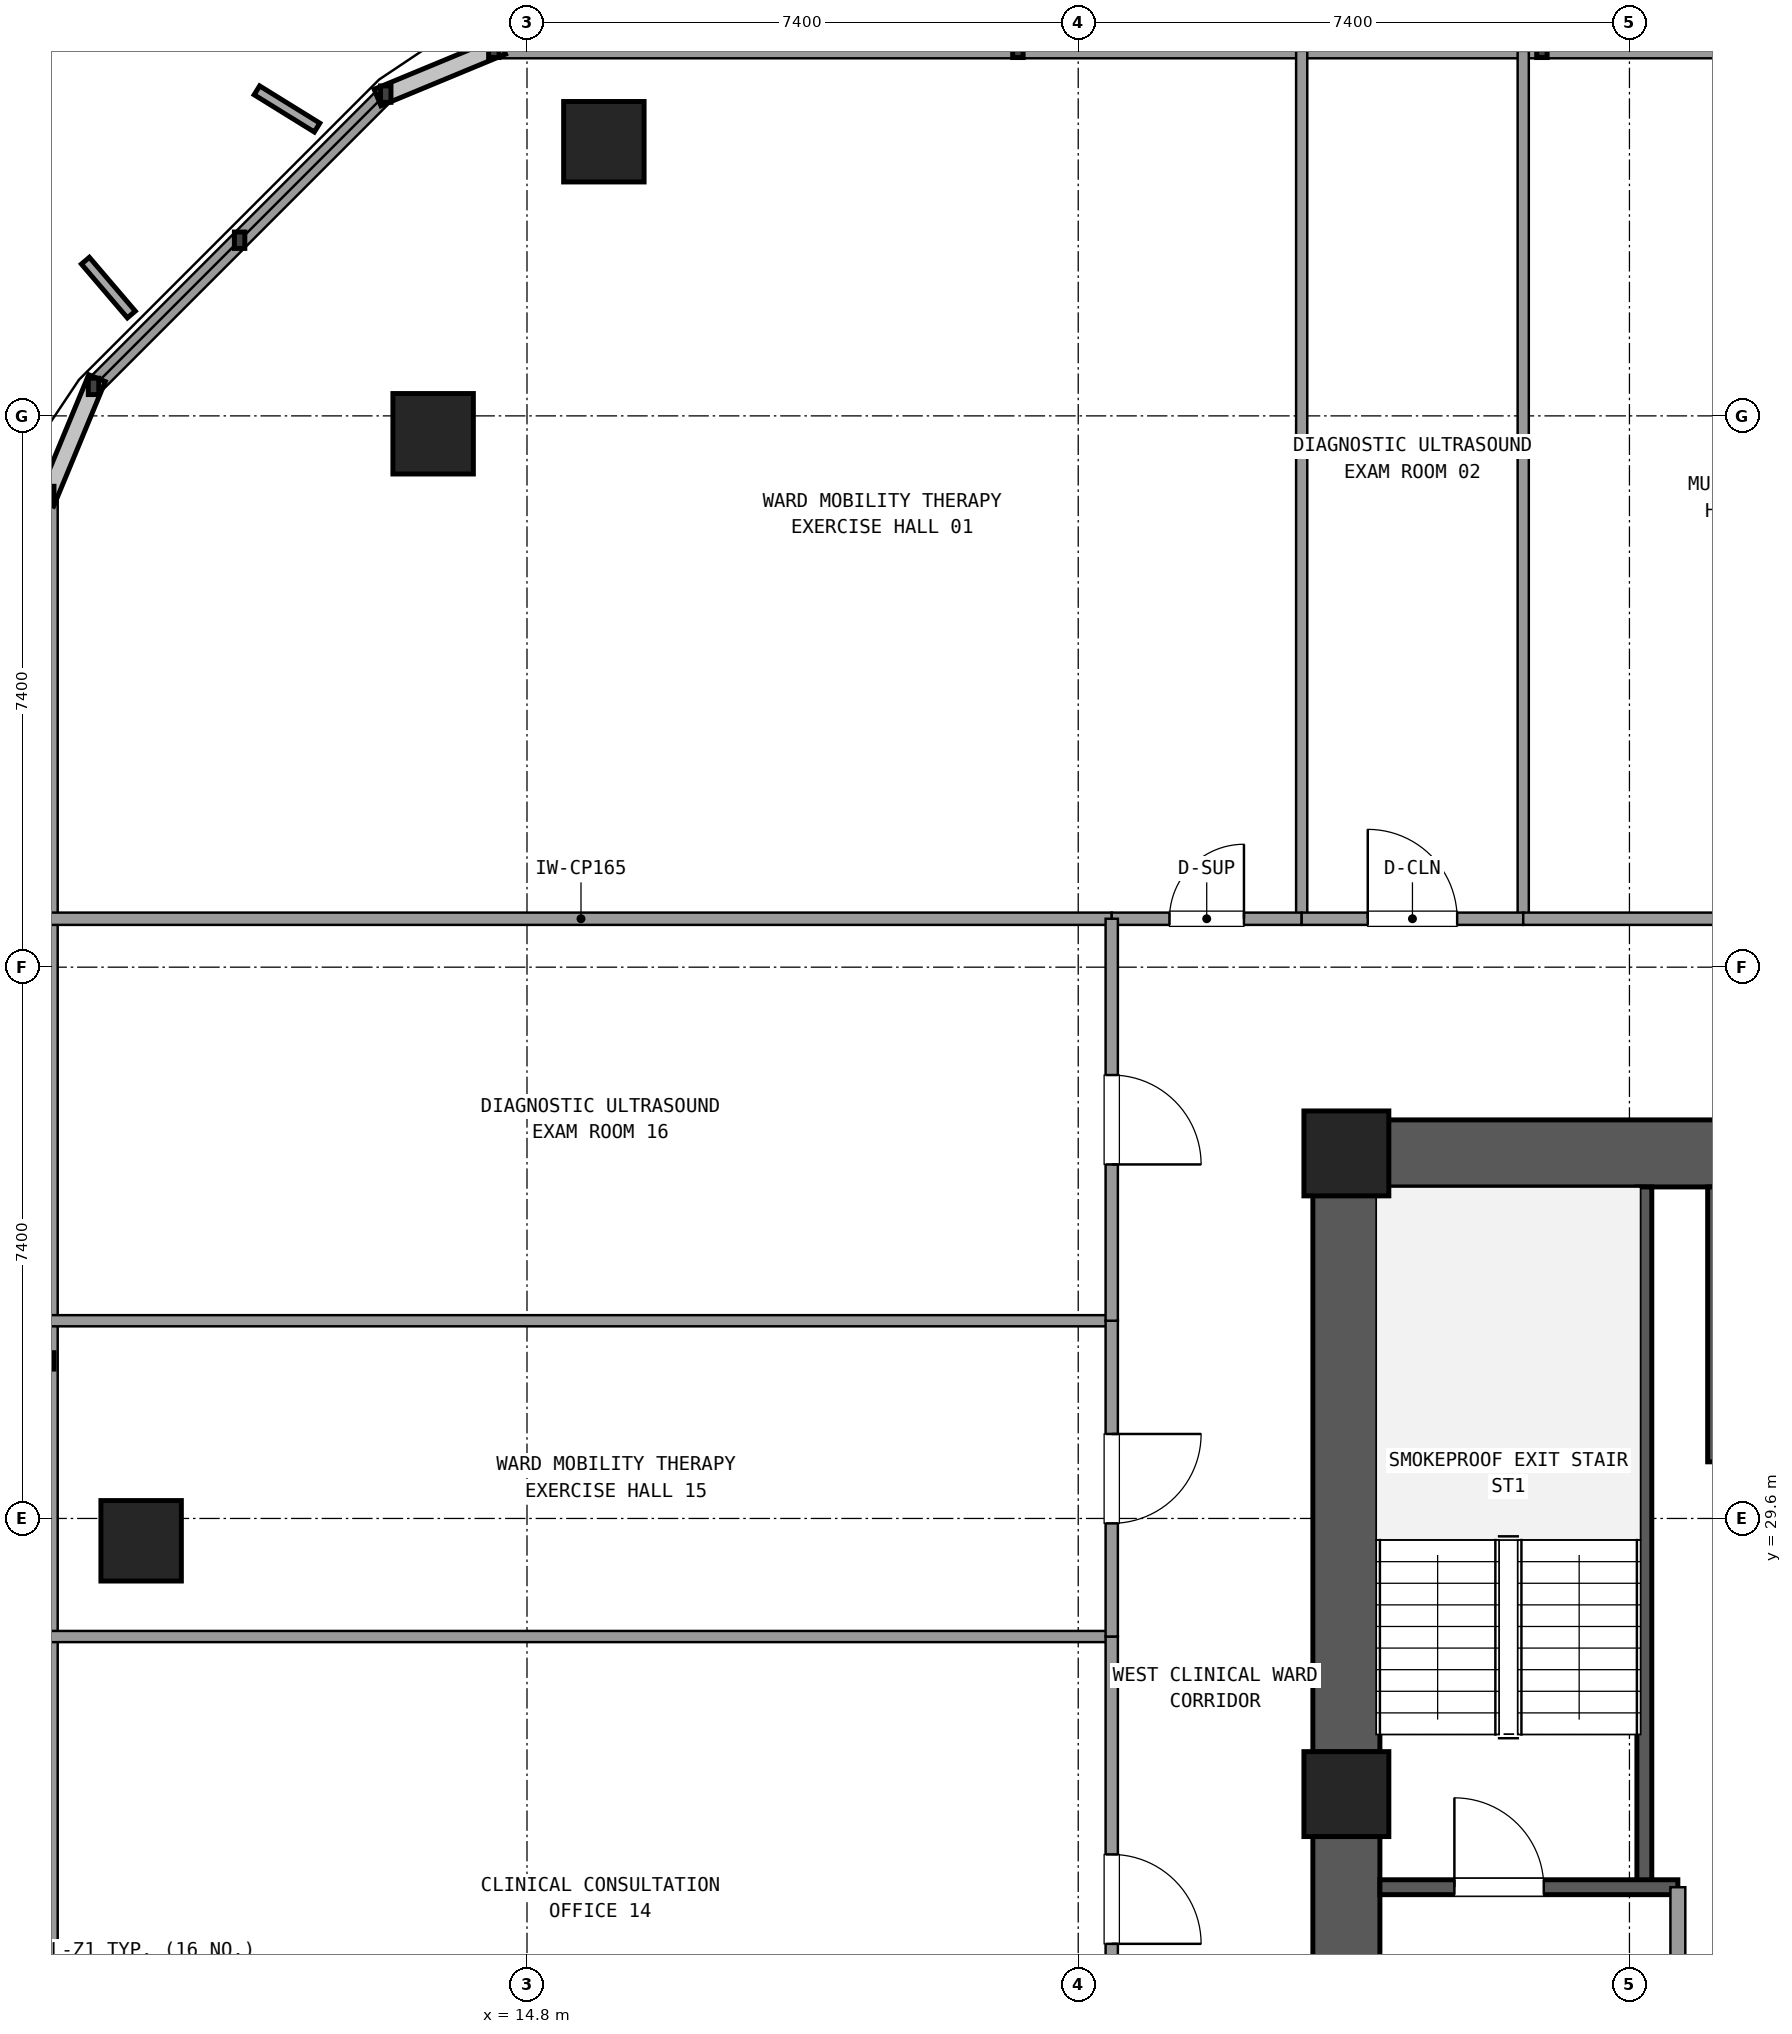
"""IFC4 building model, lengths in metres.
Left out: names, types, materials, properties, quantities, classifications, styles, units other than length and angle.
Written with IfcOpenShell. Run it as: python <this file> out.ifc"""

import sys

from ifc_helpers import new_model, si_unit, direction, frame, frame_2d, origin, origin_2d, place, context, subcontext, project, spatial, rectangle, extrude, element, fill, save


model = new_model("IFC4")
c1 = context("Model", 3, precision=1e-05, world=origin(), true_north=direction((0.0, 1.0)))
c2 = subcontext(c1, "Body", "Model", "MODEL_VIEW")
j1 = project(units=[si_unit("LENGTHUNIT", "METRE"), si_unit("PLANEANGLEUNIT", "RADIAN")], contexts=[c1])
p1 = place(None, origin())
s1 = spatial("IfcSite", under=j1, at=p1, CompositionType="ELEMENT")
p2 = place(p1, origin())
s2 = spatial("IfcBuilding", under=s1, at=p2, CompositionType="ELEMENT")
p3 = place(p2, frame((0.0, 0.0, 38.34)))
s3 = spatial("IfcBuildingStorey", under=s2, at=p3, CompositionType="ELEMENT", Elevation=38.34)
for number, where, z_axis, x_axis in (
    (1, (25.8, 34.5, 0.0), (0.0, 0.0, 1.0), (1.0, 0.0, 0.0)),
    (2, (25.8, 25.9, 0.0), (0.0, 0.0, 1.0), (1.0, 0.0, 0.0)),
):
    element("IfcColumn", number, at=place(p3, frame(where, z_axis=z_axis, x_axis=x_axis)), inside=s3, PredefinedType="COLUMN", context=c2, shape_type="SweptSolid", body=[
        extrude(rectangle(XDim=1.14, YDim=1.14, at=origin_2d()), origin(), (0.0, 0.0, 1.0), 3.6),
    ])
p4 = place(p3, frame((36.435, 34.5, 0.0), z_axis=(0.0, 0.0, 1.0), x_axis=(-1.0, 0.0, 0.0)))
e3 = element("IfcWall", 3, at=p4, inside=s3, PredefinedType="SHEAR", context=c2, shape_type="SweptSolid", body=[
    extrude(rectangle(XDim=10.07, YDim=0.9, at=frame_2d((5.035, 0.0))), origin(), (0.0, 0.0, 1.0), 3.32),
])
p5 = place(p4, frame((4.035, 0.0, 0.0)))
e4 = element("IfcOpeningElement", 4, at=p5, cuts=e3, PredefinedType="OPENING", context=c2, shape_type="SweptSolid", body=[
    extrude(rectangle(XDim=1.2, YDim=2.15, at=frame_2d((0.6, 1.075))), frame((0.0, 0.46, 0.0), z_axis=(0.0, -1.0, 0.0), x_axis=(1.0, 0.0, 0.0)), (0.0, 0.0, 1.0), 0.92),
])
p6 = place(p3, frame((25.8, 33.935, 0.0), z_axis=(0.0, 0.0, 1.0), x_axis=(0.0, -1.0, 0.0)))
e5 = element("IfcWall", 5, at=p6, inside=s3, PredefinedType="SHEAR", context=c2, shape_type="SweptSolid", body=[
    extrude(rectangle(XDim=7.47, YDim=0.9, at=frame_2d((3.735, 0.0))), origin(), (0.0, 0.0, 1.0), 3.32),
])
p7 = place(p3, frame((25.8, 25.335, 0.0), z_axis=(0.0, 0.0, 1.0), x_axis=(0.0, -1.0, 0.0)))
e6 = element("IfcWall", 6, at=p7, inside=s3, PredefinedType="SHEAR", context=c2, shape_type="SweptSolid", body=[
    extrude(rectangle(XDim=7.47, YDim=0.9, at=frame_2d((3.735, 0.0))), origin(), (0.0, 0.0, 1.0), 3.32),
])
p8 = place(p7, frame((2.085, 0.0, 0.0)))
e7 = element("IfcOpeningElement", 7, at=p8, cuts=e6, PredefinedType="OPENING", context=c2, shape_type="SweptSolid", body=[
    extrude(rectangle(XDim=1.2, YDim=2.15, at=frame_2d((0.6, 1.075))), frame((0.0, 0.46, 0.0), z_axis=(0.0, -1.0, 0.0), x_axis=(1.0, 0.0, 0.0)), (0.0, 0.0, 1.0), 0.92),
])
for number, where, z_axis, x_axis in (
    (8, (15.832, 48.08, 0.0), (0.0, 0.0, 1.0), (1.0, 0.0, 0.0)),
    (9, (13.54, 44.16, 0.0), (0.0, 0.0, 1.0), (1.0, 0.0, 0.0)),
    (10, (9.62, 29.3, 0.0), (0.0, 0.0, 1.0), (1.0, 0.0, 0.0)),
):
    element("IfcColumn", number, at=place(p3, frame(where, z_axis=z_axis, x_axis=x_axis)), inside=s3, PredefinedType="COLUMN", context=c2, shape_type="SweptSolid", body=[
        extrude(rectangle(XDim=1.08, YDim=1.08, at=origin_2d()), origin(), (0.0, 0.0, 1.0), 3.6),
    ])
p9 = place(p3, frame((35.46, 49.32, 0.0), z_axis=(0.0, 0.0, 1.0), x_axis=(-1.0, 0.0, 0.0)))
e11 = element("IfcWall", 11, at=p9, inside=s3, PredefinedType="SOLIDWALL", context=c2, shape_type="SweptSolid", body=[
    extrude(rectangle(XDim=21.105, YDim=0.24, at=frame_2d((10.552, 0.0))), origin(), (0.0, 0.0, 1.0), 0.85),
])
p10 = place(p3, frame((12.904, 48.719, 0.0), z_axis=(0.0, 0.0, 1.0), x_axis=(-0.707106781187, -0.707106781187, 0.0)))
e12 = element("IfcWall", 12, at=p10, inside=s3, PredefinedType="SOLIDWALL", context=c2, shape_type="SweptSolid", body=[
    extrude(rectangle(XDim=5.548, YDim=0.24, at=frame_2d((2.774, 0.0))), origin(), (0.0, 0.0, 1.0), 0.85),
])
p11 = place(p3, frame((8.38, 43.345, 0.0), z_axis=(0.0, 0.0, 1.0), x_axis=(0.0, -1.0, 0.0)))
e13 = element("IfcWall", 13, at=p11, inside=s3, PredefinedType="SOLIDWALL", context=c2, shape_type="SweptSolid", body=[
    extrude(rectangle(XDim=34.89, YDim=0.24, at=frame_2d((17.445, 0.0))), origin(), (0.0, 0.0, 1.0), 0.85),
])
p12 = place(p3, frame((29.8, 24.65, 0.0), z_axis=(0.0, 0.0, 1.0), x_axis=(0.0, 1.0, 0.0)))
e14 = element("IfcWall", 14, at=p12, inside=s3, PredefinedType="SHEAR", context=c2, shape_type="SweptSolid", body=[
    extrude(rectangle(XDim=9.4, YDim=0.2, at=frame_2d((4.7, 0.0))), origin(), (0.0, 0.0, 1.0), 3.32),
])
p13 = place(p3, frame((26.25, 24.65, 0.0), z_axis=(0.0, 0.0, 1.0), x_axis=(1.0, 0.0, 0.0)))
e15 = element("IfcWall", 15, at=p13, inside=s3, PredefinedType="SHEAR", context=c2, shape_type="SweptSolid", body=[
    extrude(rectangle(XDim=4.0, YDim=0.2, at=frame_2d((2.0, 0.0))), origin(), (0.0, 0.0, 1.0), 3.32),
])
p14 = place(p13, frame((1.0, 0.0, 0.0)))
e16 = element("IfcOpeningElement", 16, at=p14, cuts=e15, PredefinedType="OPENING", context=c2, shape_type="SweptSolid", body=[
    extrude(rectangle(XDim=1.2, YDim=2.15, at=frame_2d((0.6, 1.075))), frame((0.0, 0.11, 0.0), z_axis=(0.0, -1.0, 0.0), x_axis=(1.0, 0.0, 0.0)), (0.0, 0.0, 1.0), 0.22),
])
p15 = place(p3, frame((30.75, 30.36, 0.0), z_axis=(0.0, 0.0, 1.0), x_axis=(0.0, 1.0, 0.0)))
e17 = element("IfcWall", 17, at=p15, inside=s3, PredefinedType="SHEAR", context=c2, shape_type="SweptSolid", body=[
    extrude(rectangle(XDim=3.69, YDim=0.2, at=frame_2d((1.845, 0.0))), origin(), (0.0, 0.0, 1.0), 3.32),
])
p16 = place(p3, frame((30.25, 17.75, 0.0), z_axis=(0.0, 0.0, 1.0), x_axis=(0.0, 1.0, 0.0)))
e18 = element("IfcWall", 18, at=p16, inside=s3, PredefinedType="SOLIDWALL", context=c2, shape_type="SweptSolid", body=[
    extrude(rectangle(XDim=6.9, YDim=0.2, at=frame_2d((3.45, 0.0))), origin(), (0.0, 0.0, 1.0), 2.61),
])
p17 = place(p16, frame((4.15, 0.0, 0.0)))
e19 = element("IfcOpeningElement", 19, at=p17, cuts=e18, PredefinedType="OPENING", context=c2, shape_type="SweptSolid", body=[
    extrude(rectangle(XDim=1.2, YDim=2.15, at=frame_2d((0.6, 1.075))), frame((0.0, 0.11, 0.0), z_axis=(0.0, -1.0, 0.0), x_axis=(1.0, 0.0, 0.0)), (0.0, 0.0, 1.0), 0.22),
])
p18 = place(p3, frame((8.4, 37.65, 0.0), z_axis=(0.0, 0.0, 1.0), x_axis=(1.0, 0.0, 0.0)))
e20 = element("IfcWall", 20, at=p18, inside=s3, PredefinedType="PARTITIONING", context=c2, shape_type="SweptSolid", body=[
    extrude(rectangle(XDim=14.25, YDim=0.165, at=frame_2d((7.125, 0.0))), origin(), (0.0, 0.0, 1.0), 2.61),
])
p19 = place(p3, frame((25.2, 37.65, 0.0), z_axis=(0.0, 0.0, 1.0), x_axis=(0.0, 1.0, 0.0)))
e21 = element("IfcWall", 21, at=p19, inside=s3, PredefinedType="PARTITIONING", context=c2, shape_type="SweptSolid", body=[
    extrude(rectangle(XDim=11.65, YDim=0.15, at=frame_2d((5.825, 0.0))), origin(), (0.0, 0.0, 1.0), 2.61),
])
p20 = place(p3, frame((22.65, 37.65, 0.0), z_axis=(0.0, 0.0, 1.0), x_axis=(1.0, 0.0, 0.0)))
e22 = element("IfcWall", 22, at=p20, inside=s3, PredefinedType="PARTITIONING", context=c2, shape_type="SweptSolid", body=[
    extrude(rectangle(XDim=2.55, YDim=0.165, at=frame_2d((1.275, 0.0))), origin(), (0.0, 0.0, 1.0), 2.61),
])
p21 = place(p20, frame((0.775, 0.0, 0.0)))
e23 = element("IfcOpeningElement", 23, at=p21, cuts=e22, PredefinedType="OPENING", context=c2, shape_type="SweptSolid", body=[
    extrude(rectangle(XDim=1.0, YDim=2.15, at=frame_2d((0.5, 1.075))), frame((0.0, 0.093, 0.0), z_axis=(0.0, -1.0, 0.0), x_axis=(1.0, 0.0, 0.0)), (0.0, 0.0, 1.0), 0.185),
])
p22 = place(p3, frame((28.174, 37.65, 0.0), z_axis=(0.0, 0.0, 1.0), x_axis=(0.0, 1.0, 0.0)))
e24 = element("IfcWall", 24, at=p22, inside=s3, PredefinedType="PARTITIONING", context=c2, shape_type="SweptSolid", body=[
    extrude(rectangle(XDim=11.65, YDim=0.15, at=frame_2d((5.825, 0.0))), origin(), (0.0, 0.0, 1.0), 2.61),
])
p23 = place(p3, frame((25.2, 37.65, 0.0), z_axis=(0.0, 0.0, 1.0), x_axis=(1.0, 0.0, 0.0)))
e25 = element("IfcWall", 25, at=p23, inside=s3, PredefinedType="PARTITIONING", context=c2, shape_type="SweptSolid", body=[
    extrude(rectangle(XDim=2.974, YDim=0.165, at=frame_2d((1.487, 0.0))), origin(), (0.0, 0.0, 1.0), 2.61),
])
p24 = place(p23, frame((0.887, 0.0, 0.0)))
e26 = element("IfcOpeningElement", 26, at=p24, cuts=e25, PredefinedType="OPENING", context=c2, shape_type="SweptSolid", body=[
    extrude(rectangle(XDim=1.2, YDim=2.15, at=frame_2d((0.6, 1.075))), frame((0.0, 0.093, 0.0), z_axis=(0.0, -1.0, 0.0), x_axis=(1.0, 0.0, 0.0)), (0.0, 0.0, 1.0), 0.185),
])
p25 = place(p3, frame((28.174, 37.65, 0.0), z_axis=(0.0, 0.0, 1.0), x_axis=(1.0, 0.0, 0.0)))
e27 = element("IfcWall", 27, at=p25, inside=s3, PredefinedType="PARTITIONING", context=c2, shape_type="SweptSolid", body=[
    extrude(rectangle(XDim=7.026, YDim=0.165, at=frame_2d((3.513, 0.0))), origin(), (0.0, 0.0, 1.0), 2.61),
])
p26 = place(p25, frame((2.913, 0.0, 0.0)))
e28 = element("IfcOpeningElement", 28, at=p26, cuts=e27, PredefinedType="OPENING", context=c2, shape_type="SweptSolid", body=[
    extrude(rectangle(XDim=1.2, YDim=2.15, at=frame_2d((0.6, 1.075))), frame((0.0, 0.093, 0.0), z_axis=(0.0, -1.0, 0.0), x_axis=(1.0, 0.0, 0.0)), (0.0, 0.0, 1.0), 0.185),
])
p27 = place(p3, frame((22.65, 28.015, 0.0), z_axis=(0.0, 0.0, 1.0), x_axis=(-1.0, 0.0, 0.0)))
e29 = element("IfcWall", 29, at=p27, inside=s3, PredefinedType="PARTITIONING", context=c2, shape_type="SweptSolid", body=[
    extrude(rectangle(XDim=14.25, YDim=0.15, at=frame_2d((7.125, 0.0))), origin(), (0.0, 0.0, 1.0), 2.61),
])
p28 = place(p3, frame((22.65, 20.965, 0.0), z_axis=(0.0, 0.0, 1.0), x_axis=(0.0, 1.0, 0.0)))
e30 = element("IfcWall", 30, at=p28, inside=s3, PredefinedType="PARTITIONING", context=c2, shape_type="SweptSolid", body=[
    extrude(rectangle(XDim=7.05, YDim=0.165, at=frame_2d((3.525, 0.0))), origin(), (0.0, 0.0, 1.0), 2.61),
])
p29 = place(p28, frame((2.925, 0.0, 0.0)))
e31 = element("IfcOpeningElement", 31, at=p29, cuts=e30, PredefinedType="OPENING", context=c2, shape_type="SweptSolid", body=[
    extrude(rectangle(XDim=1.2, YDim=2.15, at=frame_2d((0.6, 1.075))), frame((0.0, 0.093, 0.0), z_axis=(0.0, -1.0, 0.0), x_axis=(1.0, 0.0, 0.0)), (0.0, 0.0, 1.0), 0.185),
])
p30 = place(p3, frame((22.65, 32.254, 0.0), z_axis=(0.0, 0.0, 1.0), x_axis=(-1.0, 0.0, 0.0)))
e32 = element("IfcWall", 32, at=p30, inside=s3, PredefinedType="PARTITIONING", context=c2, shape_type="SweptSolid", body=[
    extrude(rectangle(XDim=14.25, YDim=0.15, at=frame_2d((7.125, 0.0))), origin(), (0.0, 0.0, 1.0), 2.61),
])
p31 = place(p3, frame((22.65, 28.015, 0.0), z_axis=(0.0, 0.0, 1.0), x_axis=(0.0, 1.0, 0.0)))
e33 = element("IfcWall", 33, at=p31, inside=s3, PredefinedType="PARTITIONING", context=c2, shape_type="SweptSolid", body=[
    extrude(rectangle(XDim=4.239, YDim=0.165, at=frame_2d((2.12, 0.0))), origin(), (0.0, 0.0, 1.0), 2.61),
])
p32 = place(p31, frame((1.519, 0.0, 0.0)))
e34 = element("IfcOpeningElement", 34, at=p32, cuts=e33, PredefinedType="OPENING", context=c2, shape_type="SweptSolid", body=[
    extrude(rectangle(XDim=1.2, YDim=2.15, at=frame_2d((0.6, 1.075))), frame((0.0, 0.093, 0.0), z_axis=(0.0, -1.0, 0.0), x_axis=(1.0, 0.0, 0.0)), (0.0, 0.0, 1.0), 0.185),
])
p33 = place(p3, frame((22.65, 32.254, 0.0), z_axis=(0.0, 0.0, 1.0), x_axis=(0.0, 1.0, 0.0)))
e35 = element("IfcWall", 35, at=p33, inside=s3, PredefinedType="PARTITIONING", context=c2, shape_type="SweptSolid", body=[
    extrude(rectangle(XDim=5.396, YDim=0.165, at=frame_2d((2.698, 0.0))), origin(), (0.0, 0.0, 1.0), 2.61),
])
p34 = place(p33, frame((2.098, 0.0, 0.0)))
e36 = element("IfcOpeningElement", 36, at=p34, cuts=e35, PredefinedType="OPENING", context=c2, shape_type="SweptSolid", body=[
    extrude(rectangle(XDim=1.2, YDim=2.15, at=frame_2d((0.6, 1.075))), frame((0.0, 0.093, 0.0), z_axis=(0.0, -1.0, 0.0), x_axis=(1.0, 0.0, 0.0)), (0.0, 0.0, 1.0), 0.185),
])
p35 = place(p14, origin())
e37 = element("IfcDoor", 37, at=p35, inside=s3, OperationType="SINGLE_SWING_LEFT", PredefinedType="DOOR", context=c2, shape_type="SweptSolid", body=[
    extrude(rectangle(XDim=1.2, YDim=2.15, at=frame_2d((0.6, 1.075))), frame((0.0, 0.025, 0.0), z_axis=(0.0, -1.0, 0.0), x_axis=(1.0, 0.0, 0.0)), (0.0, 0.0, 1.0), 0.05),
])
fill(e16, e37)
p36 = place(p21, origin())
e38 = element("IfcDoor", 38, at=p36, inside=s3, OperationType="SINGLE_SWING_RIGHT", PredefinedType="DOOR", context=c2, shape_type="SweptSolid", body=[
    extrude(rectangle(XDim=1.0, YDim=2.15, at=frame_2d((0.5, 1.075))), frame((0.0, 0.025, 0.0), z_axis=(0.0, -1.0, 0.0), x_axis=(1.0, 0.0, 0.0)), (0.0, 0.0, 1.0), 0.05),
])
fill(e23, e38)
p37 = place(p24, origin())
e39 = element("IfcDoor", 39, at=p37, inside=s3, OperationType="SINGLE_SWING_LEFT", PredefinedType="DOOR", context=c2, shape_type="SweptSolid", body=[
    extrude(rectangle(XDim=1.2, YDim=2.15, at=frame_2d((0.6, 1.075))), frame((0.0, 0.025, 0.0), z_axis=(0.0, -1.0, 0.0), x_axis=(1.0, 0.0, 0.0)), (0.0, 0.0, 1.0), 0.05),
])
fill(e26, e39)
p38 = place(p29, frame((1.2, 0.0, 0.0), z_axis=(0.0, 0.0, 1.0), x_axis=(-1.0, 0.0, 0.0)))
e40 = element("IfcDoor", 40, at=p38, inside=s3, OperationType="SINGLE_SWING_LEFT", PredefinedType="DOOR", context=c2, shape_type="SweptSolid", body=[
    extrude(rectangle(XDim=1.2, YDim=2.15, at=frame_2d((0.6, 1.075))), frame((0.0, 0.025, 0.0), z_axis=(0.0, -1.0, 0.0), x_axis=(1.0, 0.0, 0.0)), (0.0, 0.0, 1.0), 0.05),
])
fill(e31, e40)
p39 = place(p32, frame((1.2, 0.0, 0.0), z_axis=(0.0, 0.0, 1.0), x_axis=(-1.0, 0.0, 0.0)))
e41 = element("IfcDoor", 41, at=p39, inside=s3, OperationType="SINGLE_SWING_RIGHT", PredefinedType="DOOR", context=c2, shape_type="SweptSolid", body=[
    extrude(rectangle(XDim=1.2, YDim=2.15, at=frame_2d((0.6, 1.075))), frame((0.0, 0.025, 0.0), z_axis=(0.0, -1.0, 0.0), x_axis=(1.0, 0.0, 0.0)), (0.0, 0.0, 1.0), 0.05),
])
fill(e34, e41)
p40 = place(p34, frame((1.2, 0.0, 0.0), z_axis=(0.0, 0.0, 1.0), x_axis=(-1.0, 0.0, 0.0)))
e42 = element("IfcDoor", 42, at=p40, inside=s3, OperationType="SINGLE_SWING_LEFT", PredefinedType="DOOR", context=c2, shape_type="SweptSolid", body=[
    extrude(rectangle(XDim=1.2, YDim=2.15, at=frame_2d((0.6, 1.075))), frame((0.0, 0.025, 0.0), z_axis=(0.0, -1.0, 0.0), x_axis=(1.0, 0.0, 0.0)), (0.0, 0.0, 1.0), 0.05),
])
fill(e36, e42)
save(model, sys.argv[1])
